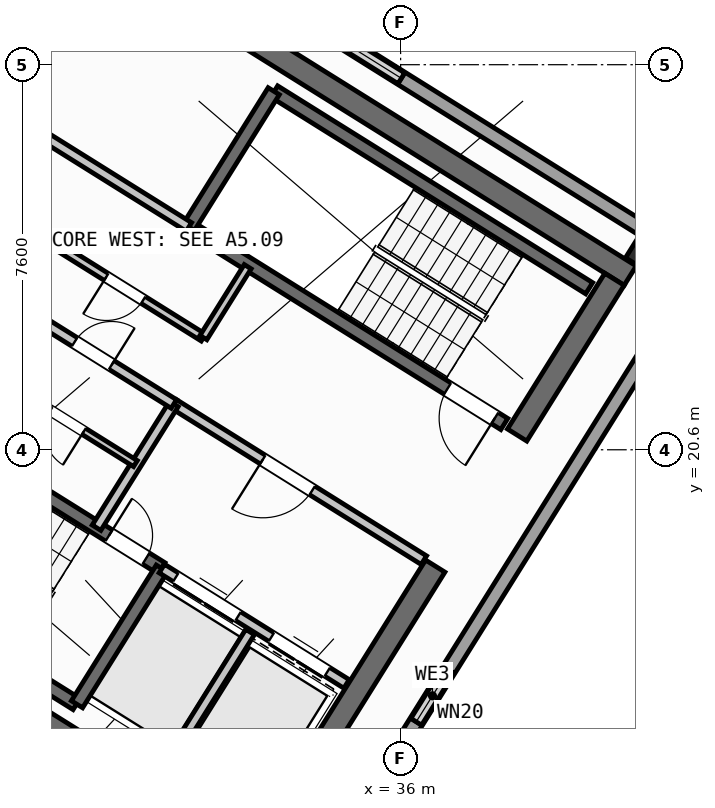
"""IFC4 building model, lengths in metres.
Left out: names, types, materials, properties, quantities, classifications, styles, units other than length and angle.
Written with IfcOpenShell. Run it as: python <this file> out.ifc"""

import sys

from ifc_helpers import new_model, si_unit, direction, frame, frame_2d, origin, origin_2d, place, context, subcontext, project, spatial, rectangle, hollow_rectangle, extrude, source, transform, mapped, element, fill, save


model = new_model("IFC4")
c1 = context("Model", 3, precision=1e-05, world=origin(), true_north=direction((0.0, 1.0)))
c2 = subcontext(c1, "Body", "Model", "MODEL_VIEW")
j1 = project(units=[si_unit("LENGTHUNIT", "METRE"), si_unit("PLANEANGLEUNIT", "RADIAN")], contexts=[c1])
p1 = place(None, origin())
s1 = spatial("IfcSite", under=j1, at=p1, CompositionType="ELEMENT")
p2 = place(p1, origin())
s2 = spatial("IfcBuilding", under=s1, at=p2, CompositionType="ELEMENT")
p3 = place(p2, frame((0.0, 0.0, 302.4)))
s3 = spatial("IfcBuildingStorey", under=s2, at=p3, CompositionType="ELEMENT", Elevation=302.4)
p4 = place(p3, frame((40.531, 24.036, 0.0), z_axis=(0.0, 0.0, 1.0), x_axis=(-0.848048787466, 0.529918157905, 0.0)))
e1 = element("IfcWall", 1, at=p4, inside=s3, PredefinedType="SHEAR", context=c2, shape_type="SweptSolid", body=[
    extrude(rectangle(XDim=13.04, YDim=0.45, at=frame_2d((6.52, 0.0))), origin(), (0.0, 0.0, 1.0), 3.32),
])
p5 = place(p3, frame((33.324, 12.503, 0.0), z_axis=(0.0, 0.0, 1.0), x_axis=(-0.848043529849, 0.529926571782, 0.0)))
e2 = element("IfcWall", 2, at=p5, inside=s3, PredefinedType="SHEAR", context=c2, shape_type="SweptSolid", body=[
    extrude(rectangle(XDim=13.04, YDim=0.45, at=frame_2d((6.52, 0.0))), origin(), (0.0, 0.0, 1.0), 3.32),
])
p6 = place(p3, frame((40.221, 23.965, 0.0), z_axis=(0.0, 0.0, 1.0), x_axis=(-0.529902075036, -0.848058836916, 0.0)))
e3 = element("IfcWall", 3, at=p6, inside=s3, PredefinedType="SHEAR", context=c2, shape_type="SweptSolid", body=[
    extrude(rectangle(XDim=3.625, YDim=0.45, at=frame_2d((1.812, 0.0))), origin(), (0.0, 0.0, 1.0), 3.32),
])
p7 = place(p3, frame((36.683, 18.304, 0.0), z_axis=(0.0, 0.0, 1.0), x_axis=(-0.529904039071, -0.848057609704, 0.0)))
e4 = element("IfcWall", 4, at=p7, inside=s3, PredefinedType="SHEAR", context=c2, shape_type="SweptSolid", body=[
    extrude(rectangle(XDim=6.475, YDim=0.45, at=frame_2d((3.238, 0.0))), origin(), (0.0, 0.0, 1.0), 3.32),
])
p8 = place(p3, frame((29.544, 30.636, 0.0), z_axis=(0.0, 0.0, 1.0), x_axis=(-0.529902075036, -0.848058836916, 0.0)))
e5 = element("IfcWall", 5, at=p8, inside=s3, PredefinedType="SHEAR", context=c2, shape_type="SweptSolid", body=[
    extrude(rectangle(XDim=3.625, YDim=0.45, at=frame_2d((1.812, 0.0))), origin(), (0.0, 0.0, 1.0), 3.32),
])
m1 = source(origin(), c2, "Body", "SweptSolid", [
    extrude(hollow_rectangle(XDim=0.5, YDim=0.5, WallThickness=0.025, at=origin_2d()), origin(), (0.0, 0.0, 1.0), 3.6),
])
p9 = place(p3, frame((40.783, 24.469, 0.0), z_axis=(0.0, 0.0, 1.0), x_axis=(-0.848048096156, 0.529919264233, 0.0)))
e6 = element("IfcColumn", 6, at=p9, inside=s3, PredefinedType="COLUMN", context=c2, shape_type="MappedRepresentation", body=[
    mapped(m1, transform((0.0, 0.0, 0.0), scale=1.0)),
])
p10 = place(p3, frame((29.124, 7.286, 0.0), z_axis=(0.0, 0.0, 1.0), x_axis=(-0.848048671495, 0.529918343499, 0.0)))
e7 = element("IfcWall", 7, at=p10, inside=s3, PredefinedType="PARAPET", context=c2, shape_type="SweptSolid", body=[
    extrude(rectangle(XDim=22.056, YDim=0.24, at=frame_2d((11.028, 0.0))), origin(), (0.0, 0.0, 1.0), 1.15),
])
p11 = place(p3, frame((12.5, 18.652, 0.0), z_axis=(0.0, 0.0, 1.0), x_axis=(0.848048578208, -0.529918492789, 0.0)))
e8 = element("IfcWall", 8, at=p11, inside=s3, PredefinedType="PARAPET", context=c2, shape_type="SweptSolid", body=[
    extrude(rectangle(XDim=20.187, YDim=0.24, at=frame_2d((10.094, 0.0))), origin(), (0.0, 0.0, 1.0), 1.15),
])
p12 = place(p3, frame((41.182, 23.031, 0.0), z_axis=(0.0, 0.0, 1.0), x_axis=(-0.529918482735, -0.84804858449, 0.0)))
e9 = element("IfcWall", 9, at=p12, inside=s3, PredefinedType="STANDARD", context=c2, shape_type="SweptSolid", body=[
    extrude(rectangle(XDim=17.184, YDim=0.28, at=frame_2d((8.592, 0.0))), origin(), (0.0, 0.0, 1.0), 3.32),
])
p13 = place(p12, frame((7.967, 0.0, 0.95)))
e10 = element("IfcOpeningElement", 10, at=p13, cuts=e9, PredefinedType="OPENING", context=c2, shape_type="SweptSolid", body=[
    extrude(rectangle(XDim=1.25, YDim=1.4, at=frame_2d((0.625, 0.7))), frame((0.0, 0.15, 0.0), z_axis=(0.0, -1.0, 0.0), x_axis=(1.0, 0.0, 0.0)), (0.0, 0.0, 1.0), 0.3),
])
p14 = place(p3, frame((30.122, 8.007, 0.0), z_axis=(0.0, 0.0, 1.0), x_axis=(-0.848046669074, 0.529921548036, 0.0)))
e11 = element("IfcWall", 11, at=p14, inside=s3, PredefinedType="STANDARD", context=c2, shape_type="SweptSolid", body=[
    extrude(rectangle(XDim=20.984, YDim=0.28, at=frame_2d((10.492, 0.0))), origin(), (0.0, 0.0, 1.0), 3.32),
])
p15 = place(p14, frame((8.009, 0.0, 0.95)))
e12 = element("IfcOpeningElement", 12, at=p15, cuts=e11, PredefinedType="OPENING", context=c2, shape_type="SweptSolid", body=[
    extrude(rectangle(XDim=1.25, YDim=1.4, at=frame_2d((0.625, 0.7))), frame((0.0, 0.15, 0.0), z_axis=(0.0, -1.0, 0.0), x_axis=(1.0, 0.0, 0.0)), (0.0, 0.0, 1.0), 0.3),
])
p16 = place(p14, frame((18.601, 0.0, 0.95)))
e13 = element("IfcOpeningElement", 13, at=p16, cuts=e11, PredefinedType="OPENING", context=c2, shape_type="SweptSolid", body=[
    extrude(rectangle(XDim=1.25, YDim=1.4, at=frame_2d((0.625, 0.7))), frame((0.0, 0.15, 0.0), z_axis=(0.0, -1.0, 0.0), x_axis=(1.0, 0.0, 0.0)), (0.0, 0.0, 1.0), 0.3),
])
p17 = place(p3, frame((22.935, 36.104, 0.0), z_axis=(0.0, 0.0, 1.0), x_axis=(0.848046669074, -0.529921548036, 0.0)))
e14 = element("IfcWall", 14, at=p17, inside=s3, PredefinedType="STANDARD", context=c2, shape_type="SweptSolid", body=[
    extrude(rectangle(XDim=20.984, YDim=0.28, at=frame_2d((10.492, 0.0))), origin(), (0.0, 0.0, 1.0), 3.32),
])
p18 = place(p17, frame((3.551, 0.0, 0.95)))
e15 = element("IfcOpeningElement", 15, at=p18, cuts=e14, PredefinedType="OPENING", context=c2, shape_type="SweptSolid", body=[
    extrude(rectangle(XDim=1.25, YDim=1.4, at=frame_2d((0.625, 0.7))), frame((0.0, 0.15, 0.0), z_axis=(0.0, -1.0, 0.0), x_axis=(1.0, 0.0, 0.0)), (0.0, 0.0, 1.0), 0.3),
])
p19 = place(p17, frame((14.193, 0.0, 0.95)))
e16 = element("IfcOpeningElement", 16, at=p19, cuts=e14, PredefinedType="OPENING", context=c2, shape_type="SweptSolid", body=[
    extrude(rectangle(XDim=1.25, YDim=1.4, at=frame_2d((0.625, 0.7))), frame((0.0, 0.15, 0.0), z_axis=(0.0, -1.0, 0.0), x_axis=(1.0, 0.0, 0.0)), (0.0, 0.0, 1.0), 0.3),
])
p20 = place(p3, frame((29.605, 15.581, 0.0), z_axis=(0.0, 0.0, 1.0), x_axis=(-0.848036911448, 0.529937163087, 0.0)))
e17 = element("IfcWall", 17, at=p20, inside=s3, PredefinedType="SHEAR", context=c2, shape_type="SweptSolid", body=[
    extrude(rectangle(XDim=7.46, YDim=0.26, at=frame_2d((3.73, 0.0))), origin(), (0.0, 0.0, 1.0), 3.32),
])
p21 = place(p3, frame((31.28, 18.261, 0.0), z_axis=(0.0, 0.0, 1.0), x_axis=(-0.848051618787, 0.529913626805, 0.0)))
e18 = element("IfcWall", 18, at=p21, inside=s3, PredefinedType="SHEAR", context=c2, shape_type="SweptSolid", body=[
    extrude(rectangle(XDim=7.46, YDim=0.26, at=frame_2d((3.73, 0.0))), origin(), (0.0, 0.0, 1.0), 3.32),
])
p22 = place(p21, frame((0.36, 0.0, 0.0)))
e19 = element("IfcOpeningElement", 19, at=p22, cuts=e18, PredefinedType="OPENING", context=c2, shape_type="SweptSolid", body=[
    extrude(rectangle(XDim=0.86, YDim=2.05, at=frame_2d((0.43, 1.025))), frame((0.0, 0.14, 0.0), z_axis=(0.0, -1.0, 0.0), x_axis=(1.0, 0.0, 0.0)), (0.0, 0.0, 1.0), 0.28),
])
p23 = place(p3, frame((31.288, 18.256, 0.0), z_axis=(0.0, 0.0, 1.0), x_axis=(-0.529943379326, -0.848033026897, 0.0)))
e20 = element("IfcWall", 20, at=p23, inside=s3, PredefinedType="SHEAR", context=c2, shape_type="SweptSolid", body=[
    extrude(rectangle(XDim=3.16, YDim=0.26, at=frame_2d((1.58, 0.0))), origin(), (0.0, 0.0, 1.0), 3.32),
])
p24 = place(p3, frame((39.721, 23.788, 0.0), z_axis=(0.0, 0.0, 1.0), x_axis=(-0.848054434086, 0.529909121291, 0.0)))
e21 = element("IfcWall", 21, at=p24, inside=s3, PredefinedType="SHEAR", context=c2, shape_type="SweptSolid", body=[
    extrude(rectangle(XDim=7.33, YDim=0.26, at=frame_2d((3.665, 0.0))), origin(), (0.0, 0.0, 1.0), 3.32),
])
p25 = place(p3, frame((38.046, 21.108, 0.0), z_axis=(0.0, 0.0, 1.0), x_axis=(-0.848054434086, 0.529909121291, 0.0)))
e22 = element("IfcWall", 22, at=p25, inside=s3, PredefinedType="SHEAR", context=c2, shape_type="SweptSolid", body=[
    extrude(rectangle(XDim=7.33, YDim=0.26, at=frame_2d((3.665, 0.0))), origin(), (0.0, 0.0, 1.0), 3.32),
])
p26 = place(p25, frame((0.22, 0.0, 0.0)))
e23 = element("IfcOpeningElement", 23, at=p26, cuts=e22, PredefinedType="OPENING", context=c2, shape_type="SweptSolid", body=[
    extrude(rectangle(XDim=1.1, YDim=2.1, at=frame_2d((0.55, 1.05))), frame((0.0, 0.14, 0.0), z_axis=(0.0, -1.0, 0.0), x_axis=(1.0, 0.0, 0.0)), (0.0, 0.0, 1.0), 0.28),
])
p27 = place(p3, frame((33.496, 27.677, 0.0), z_axis=(0.0, 0.0, 1.0), x_axis=(-0.529908658664, -0.84805472316, 0.0)))
e24 = element("IfcWall", 24, at=p27, inside=s3, PredefinedType="SHEAR", context=c2, shape_type="SweptSolid", body=[
    extrude(rectangle(XDim=3.16, YDim=0.26, at=frame_2d((1.58, 0.0))), origin(), (0.0, 0.0, 1.0), 3.32),
])
p28 = place(p3, frame((34.933, 15.978, 0.0), z_axis=(0.0, 0.0, 1.0), x_axis=(-0.848055739377, 0.529907032327, 0.0)))
e25 = element("IfcWall", 25, at=p28, inside=s3, PredefinedType="STANDARD", context=c2, shape_type="SweptSolid", body=[
    extrude(rectangle(XDim=4.298, YDim=0.2, at=frame_2d((2.149, 0.0))), origin(), (0.0, 0.0, 1.0), 3.31),
])
p29 = place(p28, frame((0.448, 0.0, 0.0)))
e26 = element("IfcOpeningElement", 26, at=p29, cuts=e25, PredefinedType="OPENING", context=c2, shape_type="SweptSolid", body=[
    extrude(rectangle(XDim=1.3, YDim=2.2, at=frame_2d((0.65, 1.1))), frame((0.0, 0.11, 0.0), z_axis=(0.0, -1.0, 0.0), x_axis=(1.0, 0.0, 0.0)), (0.0, 0.0, 1.0), 0.22),
])
p30 = place(p28, frame((2.523, 0.0, 0.0)))
e27 = element("IfcOpeningElement", 27, at=p30, cuts=e25, PredefinedType="OPENING", context=c2, shape_type="SweptSolid", body=[
    extrude(rectangle(XDim=1.45, YDim=2.25, at=frame_2d((0.725, 1.125))), frame((0.0, 0.11, 0.0), z_axis=(0.0, -1.0, 0.0), x_axis=(1.0, 0.0, 0.0)), (0.0, 0.0, 1.0), 0.22),
])
p31 = place(p3, frame((36.459, 18.421, 0.0), z_axis=(0.0, 0.0, 1.0), x_axis=(-0.848059591691, 0.529900867089, 0.0)))
e28 = element("IfcWall", 28, at=p31, inside=s3, PredefinedType="STANDARD", context=c2, shape_type="SweptSolid", body=[
    extrude(rectangle(XDim=5.818, YDim=0.2, at=frame_2d((2.909, 0.0))), origin(), (0.0, 0.0, 1.0), 3.31),
])
p32 = place(p31, frame((2.598, 0.0, 0.0)))
e29 = element("IfcOpeningElement", 29, at=p32, cuts=e28, PredefinedType="OPENING", context=c2, shape_type="SweptSolid", body=[
    extrude(rectangle(XDim=1.15, YDim=2.1, at=frame_2d((0.575, 1.05))), frame((0.0, 0.11, 0.0), z_axis=(0.0, -1.0, 0.0), x_axis=(1.0, 0.0, 0.0)), (0.0, 0.0, 1.0), 0.22),
])
p33 = place(p3, frame((31.822, 24.998, 0.0), z_axis=(0.0, 0.0, 1.0), x_axis=(-0.848054125777, 0.529909614701, 0.0)))
e30 = element("IfcWall", 30, at=p33, inside=s3, PredefinedType="STANDARD", context=c2, shape_type="SweptSolid", body=[
    extrude(rectangle(XDim=4.668, YDim=0.2, at=frame_2d((2.334, 0.0))), origin(), (0.0, 0.0, 1.0), 3.31),
])
p34 = place(p3, frame((32.108, 22.814, 0.0), z_axis=(0.0, 0.0, 1.0), x_axis=(-0.848047283855, 0.529920564185, 0.0)))
e31 = element("IfcWall", 31, at=p34, inside=s3, PredefinedType="PARTITIONING", context=c2, shape_type="SweptSolid", body=[
    extrude(rectangle(XDim=6.16, YDim=0.16, at=frame_2d((3.08, 0.0))), origin(), (0.0, 0.0, 1.0), 3.31),
])
p35 = place(p34, frame((1.4, 0.0, 0.0)))
e32 = element("IfcOpeningElement", 32, at=p35, cuts=e31, PredefinedType="OPENING", context=c2, shape_type="SweptSolid", body=[
    extrude(rectangle(XDim=0.86, YDim=2.05, at=frame_2d((0.43, 1.025))), frame((0.0, 0.09, 0.0), z_axis=(0.0, -1.0, 0.0), x_axis=(1.0, 0.0, 0.0)), (0.0, 0.0, 1.0), 0.18),
])
p36 = place(p3, frame((32.982, 24.213, 0.0), z_axis=(0.0, 0.0, 1.0), x_axis=(-0.529839334948, -0.84809803628, 0.0)))
e33 = element("IfcWall", 33, at=p36, inside=s3, PredefinedType="PARTITIONING", context=c2, shape_type="SweptSolid", body=[
    extrude(rectangle(XDim=1.65, YDim=0.16, at=frame_2d((0.825, 0.0))), origin(), (0.0, 0.0, 1.0), 3.31),
])
p37 = place(p3, frame((33.029, 17.003, 0.0), z_axis=(0.0, 0.0, 1.0), x_axis=(-0.529916267533, -0.848049968695, 0.0)))
e34 = element("IfcWall", 34, at=p37, inside=s3, PredefinedType="STANDARD", context=c2, shape_type="SweptSolid", body=[
    extrude(rectangle(XDim=2.92, YDim=0.2, at=frame_2d((1.46, 0.0))), origin(), (0.0, 0.0, 1.0), 3.31),
])
p38 = place(p3, frame((31.525, 21.504, 0.0), z_axis=(0.0, 0.0, 1.0), x_axis=(-0.529907497854, -0.848055448493, 0.0)))
e35 = element("IfcWall", 35, at=p38, inside=s3, PredefinedType="STANDARD", context=c2, shape_type="SweptSolid", body=[
    extrude(rectangle(XDim=2.88, YDim=0.2, at=frame_2d((1.44, 0.0))), origin(), (0.0, 0.0, 1.0), 3.31),
])
p39 = place(p3, frame((31.525, 21.504, 0.0), z_axis=(0.0, 0.0, 1.0), x_axis=(-0.848042066329, 0.529928913853, 0.0)))
e36 = element("IfcWall", 36, at=p39, inside=s3, PredefinedType="STANDARD", context=c2, shape_type="SweptSolid", body=[
    extrude(rectangle(XDim=6.268, YDim=0.2, at=frame_2d((3.134, 0.0))), origin(), (0.0, 0.0, 1.0), 3.31),
])
p40 = place(p39, frame((4.4, 0.0, 0.0)))
e37 = element("IfcOpeningElement", 37, at=p40, cuts=e36, PredefinedType="OPENING", context=c2, shape_type="SweptSolid", body=[
    extrude(rectangle(XDim=0.86, YDim=2.05, at=frame_2d((0.43, 1.025))), frame((0.0, 0.11, 0.0), z_axis=(0.0, -1.0, 0.0), x_axis=(1.0, 0.0, 0.0)), (0.0, 0.0, 1.0), 0.22),
])
p41 = place(p39, frame((1.45, 0.0, 0.0)))
e38 = element("IfcOpeningElement", 38, at=p41, cuts=e36, PredefinedType="OPENING", context=c2, shape_type="SweptSolid", body=[
    extrude(rectangle(XDim=0.86, YDim=2.05, at=frame_2d((0.43, 1.025))), frame((0.0, 0.11, 0.0), z_axis=(0.0, -1.0, 0.0), x_axis=(1.0, 0.0, 0.0)), (0.0, 0.0, 1.0), 0.22),
])
p42 = place(p3, frame((30.766, 20.327, 0.0), z_axis=(0.0, 0.0, 1.0), x_axis=(-0.848052663127, 0.529911955482, 0.0)))
e39 = element("IfcWall", 39, at=p42, inside=s3, PredefinedType="PLUMBINGWALL", context=c2, shape_type="SweptSolid", body=[
    extrude(rectangle(XDim=3.28, YDim=0.14, at=frame_2d((1.64, 0.0))), origin(), (0.0, 0.0, 1.0), 3.31),
])
p43 = place(p42, frame((1.2, 0.0, 0.0)))
e40 = element("IfcOpeningElement", 40, at=p43, cuts=e39, PredefinedType="OPENING", context=c2, shape_type="SweptSolid", body=[
    extrude(rectangle(XDim=0.78, YDim=2.05, at=frame_2d((0.39, 1.025))), frame((0.0, 0.08, 0.0), z_axis=(0.0, -1.0, 0.0), x_axis=(1.0, 0.0, 0.0)), (0.0, 0.0, 1.0), 0.16),
])
m2 = source(origin(), c2, "Body", "SweptSolid", [
    extrude(rectangle(XDim=1.25, YDim=1.4, at=frame_2d((0.625, 0.7))), frame((0.0, 0.03, 0.0), z_axis=(0.0, -1.0, 0.0), x_axis=(1.0, 0.0, 0.0)), (0.0, 0.0, 1.0), 0.06),
])
p44 = place(p13, origin())
e41 = element("IfcWindow", 41, at=p44, inside=s3, PartitioningType="SINGLE_PANEL", PredefinedType="WINDOW", context=c2, shape_type="MappedRepresentation", body=[
    mapped(m2, transform((0.0, 0.0, 0.0), scale=1.0)),
])
fill(e10, e41)
p45 = place(p19, origin())
e42 = element("IfcWindow", 42, at=p45, inside=s3, PartitioningType="SINGLE_PANEL", PredefinedType="WINDOW", context=c2, shape_type="MappedRepresentation", body=[
    mapped(m2, transform((0.0, 0.0, 0.0), scale=1.0)),
])
fill(e16, e42)
m3 = source(origin(), c2, "Body", "SweptSolid", [
    extrude(rectangle(XDim=0.86, YDim=2.05, at=frame_2d((0.43, 1.025))), frame((0.0, 0.025, 0.0), z_axis=(0.0, -1.0, 0.0), x_axis=(1.0, 0.0, 0.0)), (0.0, 0.0, 1.0), 0.05),
])
p46 = place(p22, frame((0.86, 0.0, 0.0), z_axis=(0.0, 0.0, 1.0), x_axis=(-1.0, 0.0, 0.0)))
e43 = element("IfcDoor", 43, at=p46, inside=s3, OperationType="SINGLE_SWING_LEFT", PredefinedType="DOOR", context=c2, shape_type="MappedRepresentation", body=[
    mapped(m3, transform((0.0, 0.0, 0.0), scale=1.0)),
])
fill(e19, e43)
p47 = place(p35, origin())
e44 = element("IfcDoor", 44, at=p47, inside=s3, OperationType="SINGLE_SWING_RIGHT", PredefinedType="DOOR", context=c2, shape_type="MappedRepresentation", body=[
    mapped(m3, transform((0.0, 0.0, 0.0), scale=1.0)),
])
fill(e32, e44)
m4 = source(origin(), c2, "Body", "SweptSolid", [
    extrude(rectangle(XDim=1.1, YDim=2.1, at=frame_2d((0.55, 1.05))), frame((0.0, 0.025, 0.0), z_axis=(0.0, -1.0, 0.0), x_axis=(1.0, 0.0, 0.0)), (0.0, 0.0, 1.0), 0.05),
])
p48 = place(p26, origin())
e45 = element("IfcDoor", 45, at=p48, inside=s3, OperationType="SINGLE_SWING_LEFT", PredefinedType="DOOR", context=c2, shape_type="MappedRepresentation", body=[
    mapped(m4, transform((0.0, 0.0, 0.0), scale=1.0)),
])
fill(e23, e45)
m5 = source(origin(), c2, "Body", "SweptSolid", [
    extrude(rectangle(XDim=1.15, YDim=2.1, at=frame_2d((0.575, 1.05))), frame((0.0, 0.025, 0.0), z_axis=(0.0, -1.0, 0.0), x_axis=(1.0, 0.0, 0.0)), (0.0, 0.0, 1.0), 0.05),
])
p49 = place(p32, origin())
e46 = element("IfcDoor", 46, at=p49, inside=s3, OperationType="SINGLE_SWING_RIGHT", PredefinedType="DOOR", context=c2, shape_type="MappedRepresentation", body=[
    mapped(m5, transform((0.0, 0.0, 0.0), scale=1.0)),
])
fill(e29, e46)
m6 = source(origin(), c2, "Body", "SweptSolid", [
    extrude(rectangle(XDim=1.3, YDim=2.2, at=frame_2d((0.65, 1.1))), frame((0.0, 0.025, 0.0), z_axis=(0.0, -1.0, 0.0), x_axis=(1.0, 0.0, 0.0)), (0.0, 0.0, 1.0), 0.05),
])
p50 = place(p29, origin())
e47 = element("IfcDoor", 47, at=p50, inside=s3, OperationType="DOUBLE_DOOR_SLIDING", PredefinedType="DOOR", context=c2, shape_type="MappedRepresentation", body=[
    mapped(m6, transform((0.0, 0.0, 0.0), scale=1.0)),
])
fill(e26, e47)
m7 = source(origin(), c2, "Body", "SweptSolid", [
    extrude(rectangle(XDim=1.45, YDim=2.25, at=frame_2d((0.725, 1.125))), frame((0.0, 0.025, 0.0), z_axis=(0.0, -1.0, 0.0), x_axis=(1.0, 0.0, 0.0)), (0.0, 0.0, 1.0), 0.05),
])
p51 = place(p30, origin())
e48 = element("IfcDoor", 48, at=p51, inside=s3, OperationType="DOUBLE_DOOR_SLIDING", PredefinedType="DOOR", context=c2, shape_type="MappedRepresentation", body=[
    mapped(m7, transform((0.0, 0.0, 0.0), scale=1.0)),
])
fill(e27, e48)
p52 = place(p41, frame((0.86, 0.0, 0.0), z_axis=(0.0, 0.0, 1.0), x_axis=(-1.0, 0.0, 0.0)))
e49 = element("IfcDoor", 49, at=p52, inside=s3, OperationType="SINGLE_SWING_RIGHT", PredefinedType="DOOR", context=c2, shape_type="MappedRepresentation", body=[
    mapped(m3, transform((0.0, 0.0, 0.0), scale=1.0)),
])
fill(e38, e49)
m8 = source(origin(), c2, "Body", "SweptSolid", [
    extrude(rectangle(XDim=0.78, YDim=2.05, at=frame_2d((0.39, 1.025))), frame((0.0, 0.025, 0.0), z_axis=(0.0, -1.0, 0.0), x_axis=(1.0, 0.0, 0.0)), (0.0, 0.0, 1.0), 0.05),
])
p53 = place(p43, origin())
e50 = element("IfcDoor", 50, at=p53, inside=s3, OperationType="SINGLE_SWING_LEFT", PredefinedType="DOOR", context=c2, shape_type="MappedRepresentation", body=[
    mapped(m8, transform((0.0, 0.0, 0.0), scale=1.0)),
])
fill(e40, e50)
save(model, sys.argv[1])
